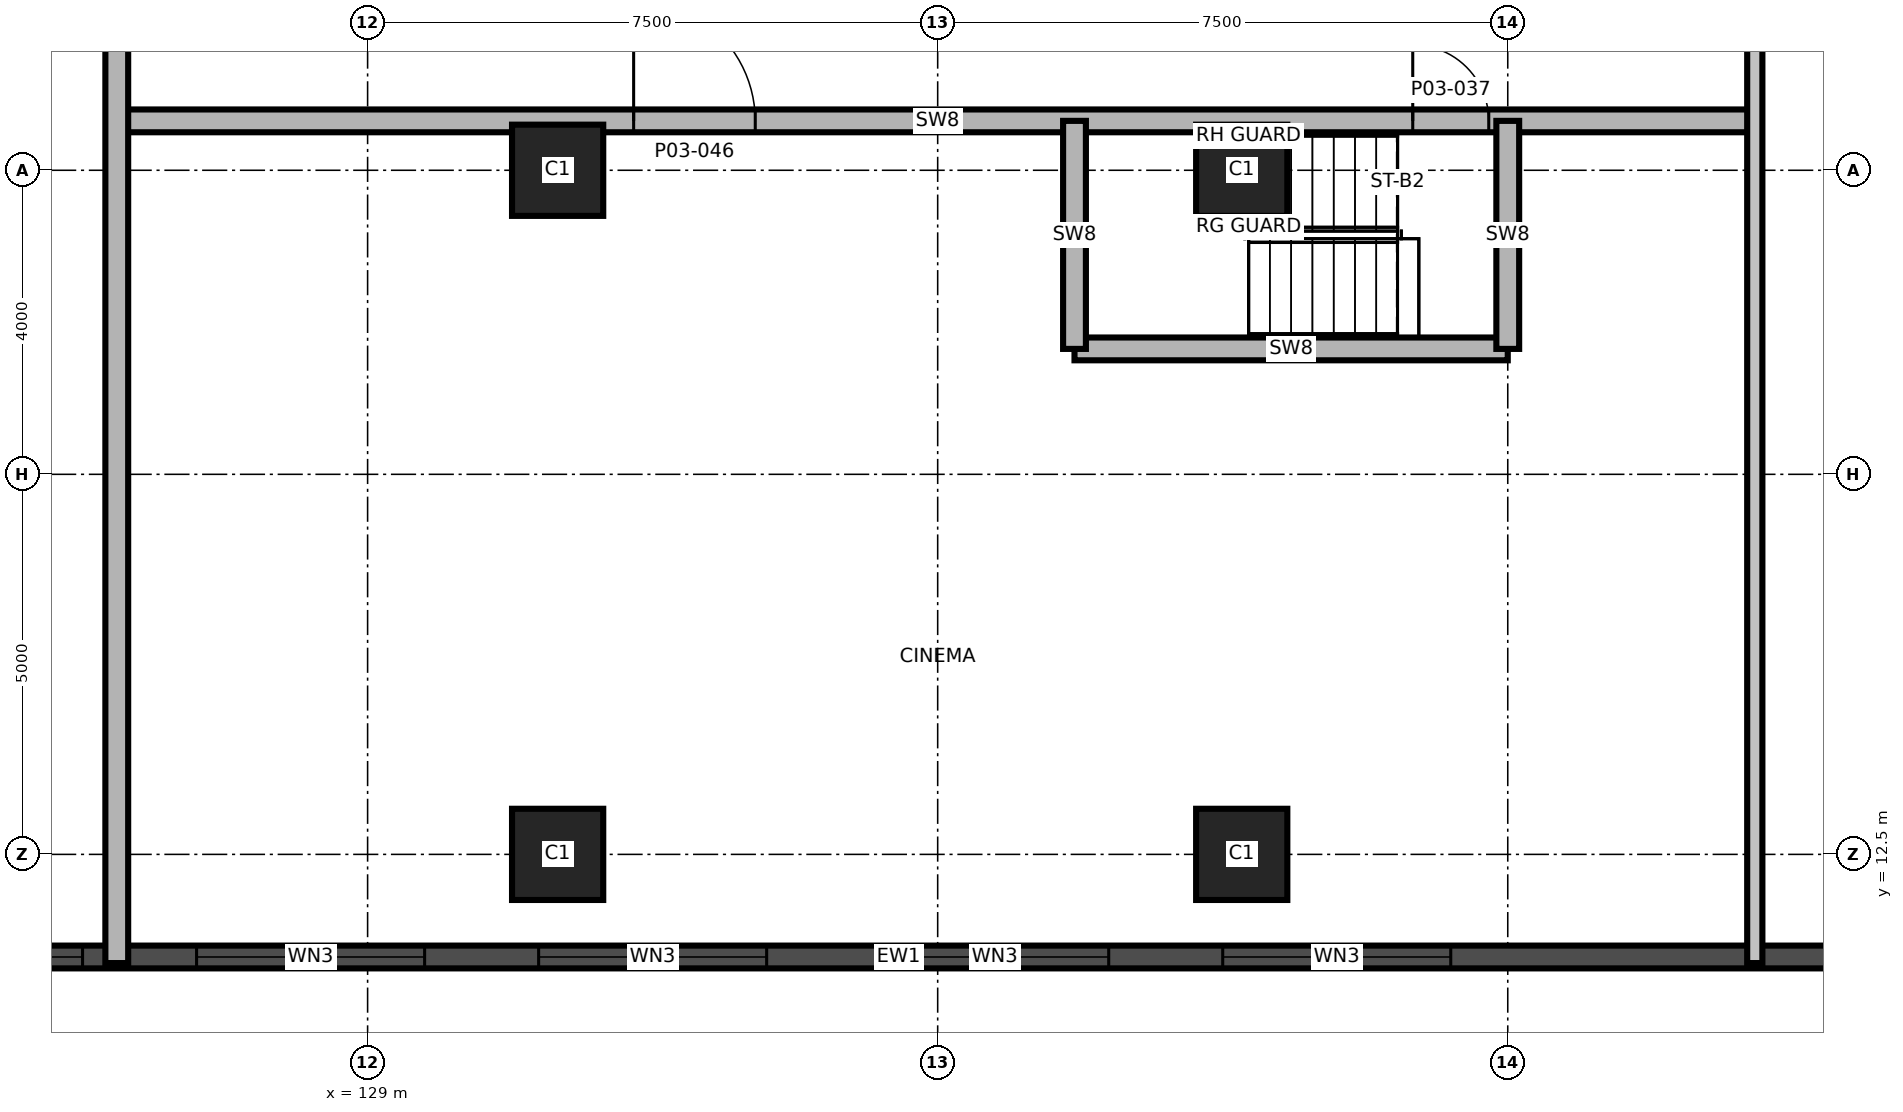
"""IFC4 building model, lengths in metres.
Left out: names, types, materials, properties, quantities, classifications, styles, units other than length and angle.
Written with IfcOpenShell. Run it as: python <this file> out.ifc"""

import sys

from ifc_helpers import new_model, si_unit, direction, frame, frame_2d, origin, origin_2d, place, context, subcontext, project, spatial, rectangle, extrude, element, fill, save


model = new_model("IFC4")
c1 = context("Model", 3, precision=1e-05, world=origin(), true_north=direction((0.0, 1.0)))
c2 = subcontext(c1, "Body", "Model", "MODEL_VIEW")
j1 = project(units=[si_unit("LENGTHUNIT", "METRE"), si_unit("PLANEANGLEUNIT", "RADIAN")], contexts=[c1])
p1 = place(None, origin())
s1 = spatial("IfcSite", under=j1, at=p1, CompositionType="ELEMENT")
p2 = place(p1, origin())
s2 = spatial("IfcBuilding", under=s1, at=p2, CompositionType="ELEMENT")
p3 = place(p2, frame((0.0, 0.0, 18.5)))
s3 = spatial("IfcBuildingStorey", under=s2, at=p3, CompositionType="ELEMENT", Elevation=18.5)
for number, where, z_axis, x_axis in (
    (1, (131.5, 12.5, 0.0), (0.0, 0.0, 1.0), (1.0, 0.0, 0.0)),
    (2, (140.5, 12.5, 0.0), (0.0, 0.0, 1.0), (1.0, 0.0, 0.0)),
    (3, (131.5, 21.5, 0.0), (0.0, 0.0, 1.0), (1.0, 0.0, 0.0)),
    (4, (140.5, 21.5, 0.0), (0.0, 0.0, 1.0), (1.0, 0.0, 0.0)),
):
    element("IfcColumn", number, at=place(p3, frame(where, z_axis=z_axis, x_axis=x_axis)), inside=s3, PredefinedType="COLUMN", context=c2, shape_type="SweptSolid", body=[
        extrude(rectangle(XDim=1.2, YDim=1.2, at=origin_2d()), origin(), (0.0, 0.0, 1.0), 5.0),
    ])
p4 = place(p3, frame((118.048, 11.15, 0.0), z_axis=(0.0, 0.0, 1.0), x_axis=(1.0, 0.0, 0.0)))
e5 = element("IfcWall", 5, at=p4, inside=s3, PredefinedType="SOLIDWALL", context=c2, shape_type="SweptSolid", body=[
    extrude(rectangle(XDim=35.88, YDim=0.3, at=frame_2d((17.94, 0.0))), origin(), (0.0, 0.0, 1.0), 4.7),
])
p5 = place(p4, frame((4.202, 0.0, 0.9)))
e6 = element("IfcOpeningElement", 6, at=p5, cuts=e5, PredefinedType="OPENING", context=c2, shape_type="SweptSolid", body=[
    extrude(rectangle(XDim=3.0, YDim=2.4, at=frame_2d((1.5, 1.2))), frame((0.0, 0.16, 0.0), z_axis=(0.0, -1.0, 0.0), x_axis=(1.0, 0.0, 0.0)), (0.0, 0.0, 1.0), 0.32),
])
p6 = place(p4, frame((8.702, 0.0, 0.9)))
e7 = element("IfcOpeningElement", 7, at=p6, cuts=e5, PredefinedType="OPENING", context=c2, shape_type="SweptSolid", body=[
    extrude(rectangle(XDim=3.0, YDim=2.4, at=frame_2d((1.5, 1.2))), frame((0.0, 0.16, 0.0), z_axis=(0.0, -1.0, 0.0), x_axis=(1.0, 0.0, 0.0)), (0.0, 0.0, 1.0), 0.32),
])
p7 = place(p4, frame((13.202, 0.0, 0.9)))
e8 = element("IfcOpeningElement", 8, at=p7, cuts=e5, PredefinedType="OPENING", context=c2, shape_type="SweptSolid", body=[
    extrude(rectangle(XDim=3.0, YDim=2.4, at=frame_2d((1.5, 1.2))), frame((0.0, 0.16, 0.0), z_axis=(0.0, -1.0, 0.0), x_axis=(1.0, 0.0, 0.0)), (0.0, 0.0, 1.0), 0.32),
])
p8 = place(p4, frame((17.702, 0.0, 0.9)))
e9 = element("IfcOpeningElement", 9, at=p8, cuts=e5, PredefinedType="OPENING", context=c2, shape_type="SweptSolid", body=[
    extrude(rectangle(XDim=3.0, YDim=2.4, at=frame_2d((1.5, 1.2))), frame((0.0, 0.16, 0.0), z_axis=(0.0, -1.0, 0.0), x_axis=(1.0, 0.0, 0.0)), (0.0, 0.0, 1.0), 0.32),
])
p9 = place(p4, frame((22.202, 0.0, 0.9)))
e10 = element("IfcOpeningElement", 10, at=p9, cuts=e5, PredefinedType="OPENING", context=c2, shape_type="SweptSolid", body=[
    extrude(rectangle(XDim=3.0, YDim=2.4, at=frame_2d((1.5, 1.2))), frame((0.0, 0.16, 0.0), z_axis=(0.0, -1.0, 0.0), x_axis=(1.0, 0.0, 0.0)), (0.0, 0.0, 1.0), 0.32),
])
p10 = place(p4, frame((31.726, 0.0, 0.9)))
e11 = element("IfcOpeningElement", 11, at=p10, cuts=e5, PredefinedType="OPENING", context=c2, shape_type="SweptSolid", body=[
    extrude(rectangle(XDim=3.0, YDim=2.4, at=frame_2d((1.5, 1.2))), frame((0.0, 0.16, 0.0), z_axis=(0.0, -1.0, 0.0), x_axis=(1.0, 0.0, 0.0)), (0.0, 0.0, 1.0), 0.32),
])
p11 = place(p3, frame((138.3, 19.15, 0.0), z_axis=(0.0, 0.0, 1.0), x_axis=(1.0, 0.0, 0.0)))
e12 = element("IfcWall", 12, at=p11, inside=s3, PredefinedType="SHEAR", context=c2, shape_type="SweptSolid", body=[
    extrude(rectangle(XDim=5.7, YDim=0.3, at=frame_2d((2.85, 0.0))), origin(), (0.0, 0.0, 1.0), 4.7),
])
p12 = place(p3, frame((125.75, 22.15, 0.0), z_axis=(0.0, 0.0, 1.0), x_axis=(1.0, 0.0, 0.0)))
e13 = element("IfcWall", 13, at=p12, inside=s3, PredefinedType="SHEAR", context=c2, shape_type="SweptSolid", body=[
    extrude(rectangle(XDim=21.5, YDim=0.3, at=frame_2d((10.75, 0.0))), origin(), (0.0, 0.0, 1.0), 4.7),
])
p13 = place(p12, frame((17.0, 0.0, 0.0)))
e14 = element("IfcOpeningElement", 14, at=p13, cuts=e13, PredefinedType="OPENING", context=c2, shape_type="SweptSolid", body=[
    extrude(rectangle(XDim=1.0, YDim=2.1, at=frame_2d((0.5, 1.05))), frame((0.0, 0.16, 0.0), z_axis=(0.0, -1.0, 0.0), x_axis=(1.0, 0.0, 0.0)), (0.0, 0.0, 1.0), 0.32),
])
p14 = place(p12, frame((6.75, 0.0, 0.0)))
e15 = element("IfcOpeningElement", 15, at=p14, cuts=e13, PredefinedType="OPENING", context=c2, shape_type="SweptSolid", body=[
    extrude(rectangle(XDim=1.6, YDim=2.1, at=frame_2d((0.8, 1.05))), frame((0.0, 0.16, 0.0), z_axis=(0.0, -1.0, 0.0), x_axis=(1.0, 0.0, 0.0)), (0.0, 0.0, 1.0), 0.32),
])
p15 = place(p3, frame((125.7, 11.07, 0.0), z_axis=(0.0, 0.0, 1.0), x_axis=(0.0, 1.0, 0.0)))
e16 = element("IfcWall", 16, at=p15, inside=s3, PredefinedType="SHEAR", context=c2, shape_type="SweptSolid", body=[
    extrude(rectangle(XDim=38.86, YDim=0.3, at=frame_2d((19.43, 0.0))), origin(), (0.0, 0.0, 1.0), 4.7),
])
p16 = place(p15, frame((24.73, 0.0, 0.0)))
e17 = element("IfcOpeningElement", 17, at=p16, cuts=e16, PredefinedType="OPENING", context=c2, shape_type="SweptSolid", body=[
    extrude(rectangle(XDim=1.2, YDim=2.1, at=frame_2d((0.6, 1.05))), frame((0.0, 0.16, 0.0), z_axis=(0.0, -1.0, 0.0), x_axis=(1.0, 0.0, 0.0)), (0.0, 0.0, 1.0), 0.32),
])
for number, where, z_axis, x_axis in (
    (18, (138.3, 19.15, 0.0), (0.0, 0.0, 1.0), (0.0, 1.0, 0.0)),
    (19, (144.0, 19.15, 0.0), (0.0, 0.0, 1.0), (0.0, 1.0, 0.0)),
):
    element("IfcWall", number, at=place(p3, frame(where, z_axis=z_axis, x_axis=x_axis)), inside=s3, PredefinedType="SHEAR", context=c2, shape_type="SweptSolid", body=[
        extrude(rectangle(XDim=3.0, YDim=0.3, at=frame_2d((1.5, 0.0))), origin(), (0.0, 0.0, 1.0), 4.7),
    ])
p17 = place(p3, frame((147.25, 11.07, 0.0), z_axis=(0.0, 0.0, 1.0), x_axis=(0.0, 1.0, 0.0)))
e20 = element("IfcWall", 20, at=p17, inside=s3, PredefinedType="PARTITIONING", context=c2, shape_type="SweptSolid", body=[
    extrude(rectangle(XDim=38.86, YDim=0.2, at=frame_2d((19.43, 0.0))), origin(), (0.0, 0.0, 1.0), 4.7),
])
p18 = place(p17, frame((18.18, 0.0, 0.0)))
e21 = element("IfcOpeningElement", 21, at=p18, cuts=e20, PredefinedType="OPENING", context=c2, shape_type="SweptSolid", body=[
    extrude(rectangle(XDim=1.5, YDim=2.1, at=frame_2d((0.75, 1.05))), frame((0.0, 0.11, 0.0), z_axis=(0.0, -1.0, 0.0), x_axis=(1.0, 0.0, 0.0)), (0.0, 0.0, 1.0), 0.22),
])
p19 = place(p17, frame((33.239, 0.0, 0.0)))
e22 = element("IfcOpeningElement", 22, at=p19, cuts=e20, PredefinedType="OPENING", context=c2, shape_type="SweptSolid", body=[
    extrude(rectangle(XDim=1.0, YDim=2.1, at=frame_2d((0.5, 1.05))), frame((0.0, 0.11, 0.0), z_axis=(0.0, -1.0, 0.0), x_axis=(1.0, 0.0, 0.0)), (0.0, 0.0, 1.0), 0.22),
])
p20 = place(p5, origin())
e23 = element("IfcWindow", 23, at=p20, inside=s3, PartitioningType="SINGLE_PANEL", PredefinedType="WINDOW", context=c2, shape_type="SweptSolid", body=[
    extrude(rectangle(XDim=3.0, YDim=2.4, at=frame_2d((1.5, 1.2))), frame((0.0, 0.03, 0.0), z_axis=(0.0, -1.0, 0.0), x_axis=(1.0, 0.0, 0.0)), (0.0, 0.0, 1.0), 0.06),
])
fill(e6, e23)
p21 = place(p6, origin())
e24 = element("IfcWindow", 24, at=p21, inside=s3, PartitioningType="SINGLE_PANEL", PredefinedType="WINDOW", context=c2, shape_type="SweptSolid", body=[
    extrude(rectangle(XDim=3.0, YDim=2.4, at=frame_2d((1.5, 1.2))), frame((0.0, 0.03, 0.0), z_axis=(0.0, -1.0, 0.0), x_axis=(1.0, 0.0, 0.0)), (0.0, 0.0, 1.0), 0.06),
])
fill(e7, e24)
p22 = place(p7, origin())
e25 = element("IfcWindow", 25, at=p22, inside=s3, PartitioningType="SINGLE_PANEL", PredefinedType="WINDOW", context=c2, shape_type="SweptSolid", body=[
    extrude(rectangle(XDim=3.0, YDim=2.4, at=frame_2d((1.5, 1.2))), frame((0.0, 0.03, 0.0), z_axis=(0.0, -1.0, 0.0), x_axis=(1.0, 0.0, 0.0)), (0.0, 0.0, 1.0), 0.06),
])
fill(e8, e25)
p23 = place(p8, origin())
e26 = element("IfcWindow", 26, at=p23, inside=s3, PartitioningType="SINGLE_PANEL", PredefinedType="WINDOW", context=c2, shape_type="SweptSolid", body=[
    extrude(rectangle(XDim=3.0, YDim=2.4, at=frame_2d((1.5, 1.2))), frame((0.0, 0.03, 0.0), z_axis=(0.0, -1.0, 0.0), x_axis=(1.0, 0.0, 0.0)), (0.0, 0.0, 1.0), 0.06),
])
fill(e9, e26)
p24 = place(p9, origin())
e27 = element("IfcWindow", 27, at=p24, inside=s3, PartitioningType="SINGLE_PANEL", PredefinedType="WINDOW", context=c2, shape_type="SweptSolid", body=[
    extrude(rectangle(XDim=3.0, YDim=2.4, at=frame_2d((1.5, 1.2))), frame((0.0, 0.03, 0.0), z_axis=(0.0, -1.0, 0.0), x_axis=(1.0, 0.0, 0.0)), (0.0, 0.0, 1.0), 0.06),
])
fill(e10, e27)
p25 = place(p13, origin())
e28 = element("IfcDoor", 28, at=p25, inside=s3, OperationType="SINGLE_SWING_LEFT", PredefinedType="DOOR", context=c2, shape_type="SweptSolid", body=[
    extrude(rectangle(XDim=1.0, YDim=2.1, at=frame_2d((0.5, 1.05))), frame((0.0, 0.025, 0.0), z_axis=(0.0, -1.0, 0.0), x_axis=(1.0, 0.0, 0.0)), (0.0, 0.0, 1.0), 0.05),
])
fill(e14, e28)
p26 = place(p14, origin())
e29 = element("IfcDoor", 29, at=p26, inside=s3, OperationType="SINGLE_SWING_RIGHT", PredefinedType="DOOR", context=c2, shape_type="SweptSolid", body=[
    extrude(rectangle(XDim=1.6, YDim=2.1, at=frame_2d((0.8, 1.05))), frame((0.0, 0.025, 0.0), z_axis=(0.0, -1.0, 0.0), x_axis=(1.0, 0.0, 0.0)), (0.0, 0.0, 1.0), 0.05),
])
fill(e15, e29)
save(model, sys.argv[1])
